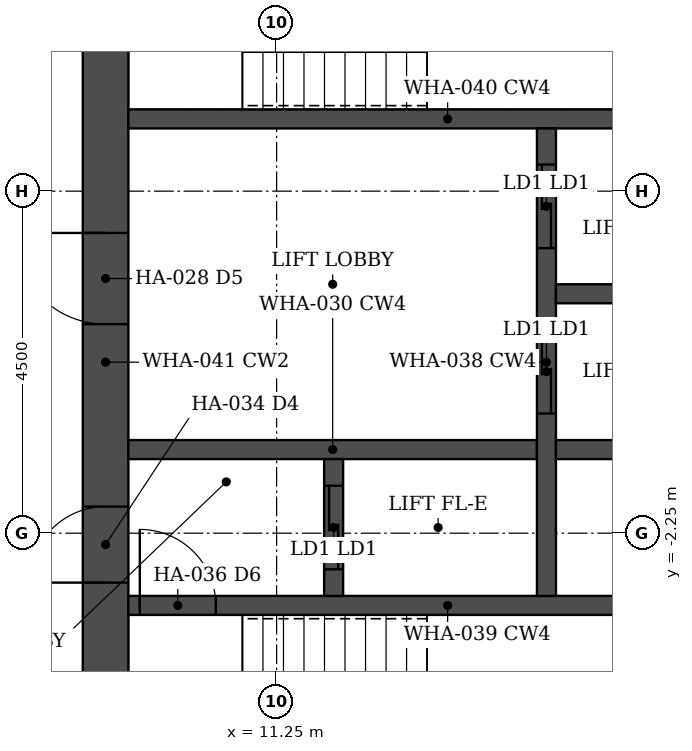
"""IFC4 building model, lengths in metres.
Left out: names, types, materials, properties, quantities, classifications, styles, units other than length and angle.
Written with IfcOpenShell. Run it as: python <this file> out.ifc"""

import sys

from ifc_helpers import new_model, si_unit, direction, frame, frame_2d, origin, place, context, subcontext, project, spatial, rectangle, extrude, element, fill, save


model = new_model("IFC4")
c1 = context("Model", 3, precision=1e-05, world=origin(), true_north=direction((0.0, 1.0)))
c2 = subcontext(c1, "Body", "Model", "MODEL_VIEW")
j1 = project(units=[si_unit("LENGTHUNIT", "METRE"), si_unit("PLANEANGLEUNIT", "RADIAN")], contexts=[c1])
p1 = place(None, origin())
s1 = spatial("IfcSite", under=j1, at=p1, CompositionType="ELEMENT")
p2 = place(p1, origin())
s2 = spatial("IfcBuilding", under=s1, at=p2, CompositionType="ELEMENT")
p3 = place(p2, frame((0.0, 0.0, 118.4)))
s3 = spatial("IfcBuildingStorey", under=s2, at=p3, CompositionType="ELEMENT", Elevation=118.4)
p4 = place(p3, frame((9.0, -6.45, 0.0), z_axis=(0.0, 0.0, 1.0), x_axis=(0.0, 1.0, 0.0)))
e1 = element("IfcWall", 1, at=p4, inside=s3, PredefinedType="SHEAR", context=c2, shape_type="SweptSolid", body=[
    extrude(rectangle(XDim=12.9, YDim=0.6, at=frame_2d((6.45, 0.0))), origin(), (0.0, 0.0, 1.0), 3.6),
])
p5 = place(p4, frame((3.55, 0.0, 0.0)))
e2 = element("IfcOpeningElement", 2, at=p5, cuts=e1, PredefinedType="OPENING", context=c2, shape_type="SweptSolid", body=[
    extrude(rectangle(XDim=1.0, YDim=2.1, at=frame_2d((0.5, 1.05))), frame((0.0, 0.31, 0.0), z_axis=(0.0, -1.0, 0.0), x_axis=(1.0, 0.0, 0.0)), (0.0, 0.0, 1.0), 0.62),
])
p6 = place(p4, frame((6.95, 0.0, 0.0)))
e3 = element("IfcOpeningElement", 3, at=p6, cuts=e1, PredefinedType="OPENING", context=c2, shape_type="SweptSolid", body=[
    extrude(rectangle(XDim=1.2, YDim=2.1, at=frame_2d((0.6, 1.05))), frame((0.0, 0.31, 0.0), z_axis=(0.0, -1.0, 0.0), x_axis=(1.0, 0.0, 0.0)), (0.0, 0.0, 1.0), 0.62),
])
p7 = place(p4, frame((10.85, 0.0, 0.0)))
e4 = element("IfcOpeningElement", 4, at=p7, cuts=e1, PredefinedType="OPENING", context=c2, shape_type="SweptSolid", body=[
    extrude(rectangle(XDim=1.0, YDim=2.1, at=frame_2d((0.5, 1.05))), frame((0.0, 0.31, 0.0), z_axis=(0.0, -1.0, 0.0), x_axis=(1.0, 0.0, 0.0)), (0.0, 0.0, 1.0), 0.62),
])
p8 = place(p3, frame((9.3, -3.2, 0.0), z_axis=(0.0, 0.0, 1.0), x_axis=(1.0, 0.0, 0.0)))
e5 = element("IfcWall", 5, at=p8, inside=s3, PredefinedType="SHEAR", context=c2, shape_type="SweptSolid", body=[
    extrude(rectangle(XDim=8.4, YDim=0.25, at=frame_2d((4.2, 0.0))), origin(), (0.0, 0.0, 1.0), 3.6),
])
p9 = place(p8, frame((0.15, 0.0, 0.0)))
e6 = element("IfcOpeningElement", 6, at=p9, cuts=e5, PredefinedType="OPENING", context=c2, shape_type="SweptSolid", body=[
    extrude(rectangle(XDim=1.0, YDim=2.1, at=frame_2d((0.5, 1.05))), frame((0.0, 0.135, 0.0), z_axis=(0.0, -1.0, 0.0), x_axis=(1.0, 0.0, 0.0)), (0.0, 0.0, 1.0), 0.27),
])
p10 = place(p3, frame((9.3, 3.2, 0.0), z_axis=(0.0, 0.0, 1.0), x_axis=(1.0, 0.0, 0.0)))
e7 = element("IfcWall", 7, at=p10, inside=s3, PredefinedType="SHEAR", context=c2, shape_type="SweptSolid", body=[
    extrude(rectangle(XDim=8.4, YDim=0.25, at=frame_2d((4.2, 0.0))), origin(), (0.0, 0.0, 1.0), 3.6),
])
p11 = place(p3, frame((9.3, -1.15, 0.0), z_axis=(0.0, 0.0, 1.0), x_axis=(1.0, 0.0, 0.0)))
e8 = element("IfcWall", 8, at=p11, inside=s3, PredefinedType="SHEAR", context=c2, shape_type="SweptSolid", body=[
    extrude(rectangle(XDim=5.375, YDim=0.25, at=frame_2d((2.688, 0.0))), origin(), (0.0, 0.0, 1.0), 3.6),
])
p12 = place(p3, frame((12.0, -3.075, 0.0), z_axis=(0.0, 0.0, 1.0), x_axis=(0.0, 1.0, 0.0)))
e9 = element("IfcWall", 9, at=p12, inside=s3, PredefinedType="SHEAR", context=c2, shape_type="SweptSolid", body=[
    extrude(rectangle(XDim=1.8, YDim=0.25, at=frame_2d((0.9, 0.0))), origin(), (0.0, 0.0, 1.0), 3.6),
])
p13 = place(p12, frame((0.35, 0.0, 0.0)))
e10 = element("IfcOpeningElement", 10, at=p13, cuts=e9, PredefinedType="OPENING", context=c2, shape_type="SweptSolid", body=[
    extrude(rectangle(XDim=1.1, YDim=2.1, at=frame_2d((0.55, 1.05))), frame((0.0, 0.135, 0.0), z_axis=(0.0, -1.0, 0.0), x_axis=(1.0, 0.0, 0.0)), (0.0, 0.0, 1.0), 0.27),
])
p14 = place(p3, frame((14.8, -3.075, 0.0), z_axis=(0.0, 0.0, 1.0), x_axis=(0.0, 1.0, 0.0)))
e11 = element("IfcWall", 11, at=p14, inside=s3, PredefinedType="SHEAR", context=c2, shape_type="SweptSolid", body=[
    extrude(rectangle(XDim=6.15, YDim=0.25, at=frame_2d((3.075, 0.0))), origin(), (0.0, 0.0, 1.0), 3.6),
])
p15 = place(p14, frame((2.4, 0.0, 0.0)))
e12 = element("IfcOpeningElement", 12, at=p15, cuts=e11, PredefinedType="OPENING", context=c2, shape_type="SweptSolid", body=[
    extrude(rectangle(XDim=1.1, YDim=2.1, at=frame_2d((0.55, 1.05))), frame((0.0, 0.135, 0.0), z_axis=(0.0, -1.0, 0.0), x_axis=(1.0, 0.0, 0.0)), (0.0, 0.0, 1.0), 0.27),
])
p16 = place(p14, frame((4.575, 0.0, 0.0)))
e13 = element("IfcOpeningElement", 13, at=p16, cuts=e11, PredefinedType="OPENING", context=c2, shape_type="SweptSolid", body=[
    extrude(rectangle(XDim=1.1, YDim=2.1, at=frame_2d((0.55, 1.05))), frame((0.0, 0.135, 0.0), z_axis=(0.0, -1.0, 0.0), x_axis=(1.0, 0.0, 0.0)), (0.0, 0.0, 1.0), 0.27),
])
for number, where, z_axis, x_axis in (
    (14, (14.925, -1.15, 0.0), (0.0, 0.0, 1.0), (1.0, 0.0, 0.0)),
    (15, (14.925, 0.9, 0.0), (0.0, 0.0, 1.0), (1.0, 0.0, 0.0)),
):
    element("IfcWall", number, at=place(p3, frame(where, z_axis=z_axis, x_axis=x_axis)), inside=s3, PredefinedType="SHEAR", context=c2, shape_type="SweptSolid", body=[
        extrude(rectangle(XDim=2.775, YDim=0.25, at=frame_2d((1.387, 0.0))), origin(), (0.0, 0.0, 1.0), 3.6),
    ])
p17 = place(p5, origin())
e16 = element("IfcDoor", 16, at=p17, inside=s3, OperationType="SINGLE_SWING_LEFT", PredefinedType="DOOR", context=c2, shape_type="SweptSolid", body=[
    extrude(rectangle(XDim=1.0, YDim=2.1, at=frame_2d((0.5, 1.05))), frame((0.0, 0.025, 0.0), z_axis=(0.0, -1.0, 0.0), x_axis=(1.0, 0.0, 0.0)), (0.0, 0.0, 1.0), 0.05),
])
fill(e2, e16)
p18 = place(p9, origin())
e17 = element("IfcDoor", 17, at=p18, inside=s3, OperationType="SINGLE_SWING_LEFT", PredefinedType="DOOR", context=c2, shape_type="SweptSolid", body=[
    extrude(rectangle(XDim=1.0, YDim=2.1, at=frame_2d((0.5, 1.05))), frame((0.0, 0.025, 0.0), z_axis=(0.0, -1.0, 0.0), x_axis=(1.0, 0.0, 0.0)), (0.0, 0.0, 1.0), 0.05),
])
fill(e6, e17)
p19 = place(p6, origin())
e18 = element("IfcDoor", 18, at=p19, inside=s3, OperationType="SINGLE_SWING_RIGHT", PredefinedType="DOOR", context=c2, shape_type="SweptSolid", body=[
    extrude(rectangle(XDim=1.2, YDim=2.1, at=frame_2d((0.6, 1.05))), frame((0.0, 0.025, 0.0), z_axis=(0.0, -1.0, 0.0), x_axis=(1.0, 0.0, 0.0)), (0.0, 0.0, 1.0), 0.05),
])
fill(e3, e18)
p20 = place(p13, origin())
e19 = element("IfcDoor", 19, at=p20, inside=s3, OperationType="DOUBLE_DOOR_SLIDING", PredefinedType="DOOR", context=c2, shape_type="SweptSolid", body=[
    extrude(rectangle(XDim=1.1, YDim=2.1, at=frame_2d((0.55, 1.05))), frame((0.0, 0.025, 0.0), z_axis=(0.0, -1.0, 0.0), x_axis=(1.0, 0.0, 0.0)), (0.0, 0.0, 1.0), 0.05),
])
fill(e10, e19)
p21 = place(p15, origin())
e20 = element("IfcDoor", 20, at=p21, inside=s3, OperationType="DOUBLE_DOOR_SLIDING", PredefinedType="DOOR", context=c2, shape_type="SweptSolid", body=[
    extrude(rectangle(XDim=1.1, YDim=2.1, at=frame_2d((0.55, 1.05))), frame((0.0, 0.025, 0.0), z_axis=(0.0, -1.0, 0.0), x_axis=(1.0, 0.0, 0.0)), (0.0, 0.0, 1.0), 0.05),
])
fill(e12, e20)
p22 = place(p16, origin())
e21 = element("IfcDoor", 21, at=p22, inside=s3, OperationType="DOUBLE_DOOR_SLIDING", PredefinedType="DOOR", context=c2, shape_type="SweptSolid", body=[
    extrude(rectangle(XDim=1.1, YDim=2.1, at=frame_2d((0.55, 1.05))), frame((0.0, 0.025, 0.0), z_axis=(0.0, -1.0, 0.0), x_axis=(1.0, 0.0, 0.0)), (0.0, 0.0, 1.0), 0.05),
])
fill(e13, e21)
save(model, sys.argv[1])
